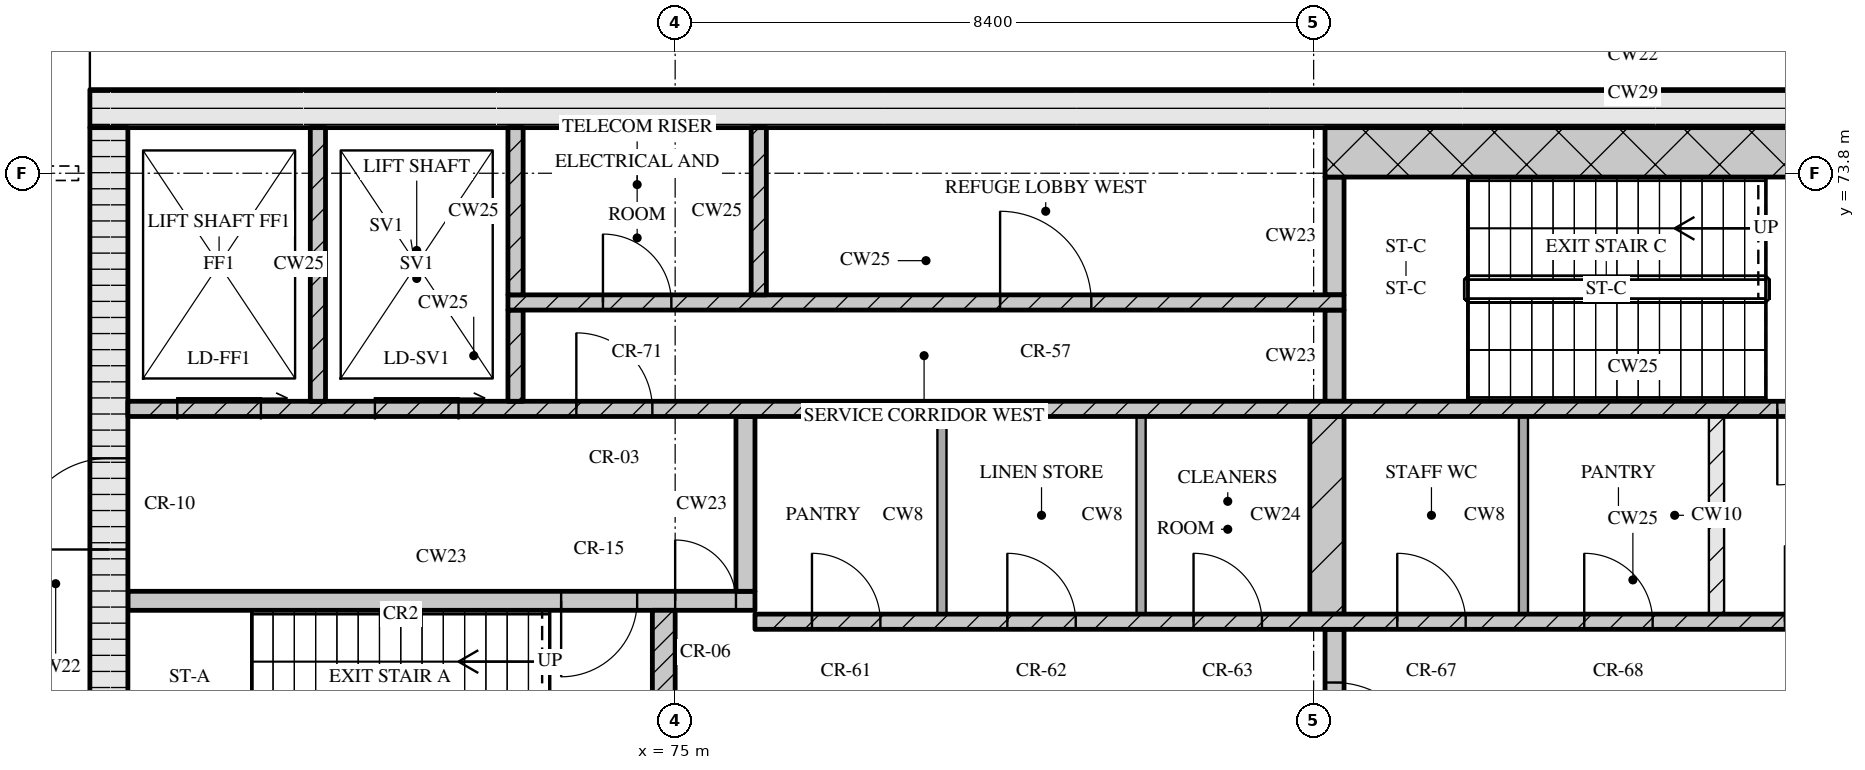
"""IFC4 building model, lengths in metres.
Left out: names, types, materials, properties, quantities, classifications, styles, units other than length and angle.
Written with IfcOpenShell. Run it as: python <this file> out.ifc"""

import sys

from ifc_helpers import new_model, si_unit, direction, frame, frame_2d, origin, place, context, subcontext, project, spatial, rectangle, extrude, element, fill, save


model = new_model("IFC4")
c1 = context("Model", 3, precision=1e-05, world=origin(), true_north=direction((0.0, 1.0)))
c2 = subcontext(c1, "Body", "Model", "MODEL_VIEW")
j1 = project(units=[si_unit("LENGTHUNIT", "METRE"), si_unit("PLANEANGLEUNIT", "RADIAN")], contexts=[c1])
p1 = place(None, origin())
s1 = spatial("IfcSite", under=j1, at=p1, CompositionType="ELEMENT")
p2 = place(p1, origin())
s2 = spatial("IfcBuilding", under=s1, at=p2, CompositionType="ELEMENT")
p3 = place(p2, frame((0.0, 0.0, 252.3)))
s3 = spatial("IfcBuildingStorey", under=s2, at=p3, CompositionType="ELEMENT", Elevation=252.3)
p4 = place(p3, frame((67.3, 74.65, 0.0), z_axis=(0.0, 0.0, 1.0), x_axis=(1.0, 0.0, 0.0)))
e1 = element("IfcWall", 1, at=p4, inside=s3, PredefinedType="SOLIDWALL", context=c2, shape_type="SweptSolid", body=[
    extrude(rectangle(XDim=40.6, YDim=0.5, at=frame_2d((20.3, 0.0))), origin(), (0.0, 0.0, 1.0), 10.97),
])
p5 = place(p3, frame((67.55, 62.4, 0.0), z_axis=(0.0, 0.0, 1.0), x_axis=(0.0, 1.0, 0.0)))
e2 = element("IfcWall", 2, at=p5, inside=s3, PredefinedType="SOLIDWALL", context=c2, shape_type="SweptSolid", body=[
    extrude(rectangle(XDim=12.0, YDim=0.5, at=frame_2d((6.0, 0.0))), origin(), (0.0, 0.0, 1.0), 10.97),
])
p6 = place(p5, frame((6.45, 0.0, 0.0)))
e3 = element("IfcOpeningElement", 3, at=p6, cuts=e2, PredefinedType="OPENING", context=c2, shape_type="SweptSolid", body=[
    extrude(rectangle(XDim=1.2, YDim=2.1, at=frame_2d((0.6, 1.05))), frame((0.0, 0.26, 0.0), z_axis=(0.0, -1.0, 0.0), x_axis=(1.0, 0.0, 0.0)), (0.0, 0.0, 1.0), 0.52),
])
p7 = place(p3, frame((74.85, 65.2, 0.0), z_axis=(0.0, 0.0, 1.0), x_axis=(0.0, 1.0, 0.0)))
e4 = element("IfcWall", 4, at=p7, inside=s3, PredefinedType="SOLIDWALL", context=c2, shape_type="SweptSolid", body=[
    extrude(rectangle(XDim=2.85, YDim=0.3, at=frame_2d((1.425, 0.0))), origin(), (0.0, 0.0, 1.0), 10.97),
])
p8 = place(p3, frame((83.675, 65.2, 0.0), z_axis=(0.0, 0.0, 1.0), x_axis=(0.0, 1.0, 0.0)))
e5 = element("IfcWall", 5, at=p8, inside=s3, PredefinedType="SOLIDWALL", context=c2, shape_type="SweptSolid", body=[
    extrude(rectangle(XDim=2.6, YDim=0.25, at=frame_2d((1.3, 0.0))), origin(), (0.0, 0.0, 1.0), 10.97),
])
p9 = place(p8, frame((0.7, 0.0, 0.0)))
e6 = element("IfcOpeningElement", 6, at=p9, cuts=e5, PredefinedType="OPENING", context=c2, shape_type="SweptSolid", body=[
    extrude(rectangle(XDim=1.2, YDim=2.1, at=frame_2d((0.6, 1.05))), frame((0.0, 0.135, 0.0), z_axis=(0.0, -1.0, 0.0), x_axis=(1.0, 0.0, 0.0)), (0.0, 0.0, 1.0), 0.27),
])
p10 = place(p3, frame((76.05, 67.9, 0.0), z_axis=(0.0, 0.0, 1.0), x_axis=(1.0, 0.0, 0.0)))
e7 = element("IfcWall", 7, at=p10, inside=s3, PredefinedType="SOLIDWALL", context=c2, shape_type="SweptSolid", body=[
    extrude(rectangle(XDim=23.1, YDim=0.2, at=frame_2d((11.55, 0.0))), origin(), (0.0, 0.0, 1.0), 10.97),
])
p11 = place(p10, frame((0.75, 0.0, 0.0)))
e8 = element("IfcOpeningElement", 8, at=p11, cuts=e7, PredefinedType="OPENING", context=c2, shape_type="SweptSolid", body=[
    extrude(rectangle(XDim=0.9, YDim=2.1, at=frame_2d((0.45, 1.05))), frame((0.0, 0.11, 0.0), z_axis=(0.0, -1.0, 0.0), x_axis=(1.0, 0.0, 0.0)), (0.0, 0.0, 1.0), 0.22),
])
p12 = place(p10, frame((3.32, 0.0, 0.0)))
e9 = element("IfcOpeningElement", 9, at=p12, cuts=e7, PredefinedType="OPENING", context=c2, shape_type="SweptSolid", body=[
    extrude(rectangle(XDim=0.9, YDim=2.1, at=frame_2d((0.45, 1.05))), frame((0.0, 0.11, 0.0), z_axis=(0.0, -1.0, 0.0), x_axis=(1.0, 0.0, 0.0)), (0.0, 0.0, 1.0), 0.22),
])
p13 = place(p10, frame((5.77, 0.0, 0.0)))
e10 = element("IfcOpeningElement", 10, at=p13, cuts=e7, PredefinedType="OPENING", context=c2, shape_type="SweptSolid", body=[
    extrude(rectangle(XDim=0.9, YDim=2.1, at=frame_2d((0.45, 1.05))), frame((0.0, 0.11, 0.0), z_axis=(0.0, -1.0, 0.0), x_axis=(1.0, 0.0, 0.0)), (0.0, 0.0, 1.0), 0.22),
])
p14 = place(p10, frame((8.45, 0.0, 0.0)))
e11 = element("IfcOpeningElement", 11, at=p14, cuts=e7, PredefinedType="OPENING", context=c2, shape_type="SweptSolid", body=[
    extrude(rectangle(XDim=0.9, YDim=2.1, at=frame_2d((0.45, 1.05))), frame((0.0, 0.11, 0.0), z_axis=(0.0, -1.0, 0.0), x_axis=(1.0, 0.0, 0.0)), (0.0, 0.0, 1.0), 0.22),
])
p15 = place(p10, frame((10.91, 0.0, 0.0)))
e12 = element("IfcOpeningElement", 12, at=p15, cuts=e7, PredefinedType="OPENING", context=c2, shape_type="SweptSolid", body=[
    extrude(rectangle(XDim=0.9, YDim=2.1, at=frame_2d((0.45, 1.05))), frame((0.0, 0.11, 0.0), z_axis=(0.0, -1.0, 0.0), x_axis=(1.0, 0.0, 0.0)), (0.0, 0.0, 1.0), 0.22),
])
p16 = place(p10, frame((13.55, 0.0, 0.0)))
e13 = element("IfcOpeningElement", 13, at=p16, cuts=e7, PredefinedType="OPENING", context=c2, shape_type="SweptSolid", body=[
    extrude(rectangle(XDim=1.0, YDim=2.1, at=frame_2d((0.5, 1.05))), frame((0.0, 0.11, 0.0), z_axis=(0.0, -1.0, 0.0), x_axis=(1.0, 0.0, 0.0)), (0.0, 0.0, 1.0), 0.22),
])
p17 = place(p10, frame((16.2, 0.0, 0.0)))
e14 = element("IfcOpeningElement", 14, at=p17, cuts=e7, PredefinedType="OPENING", context=c2, shape_type="SweptSolid", body=[
    extrude(rectangle(XDim=1.1, YDim=2.1, at=frame_2d((0.55, 1.05))), frame((0.0, 0.11, 0.0), z_axis=(0.0, -1.0, 0.0), x_axis=(1.0, 0.0, 0.0)), (0.0, 0.0, 1.0), 0.22),
])
p18 = place(p10, frame((18.7, 0.0, 0.0)))
e15 = element("IfcOpeningElement", 15, at=p18, cuts=e7, PredefinedType="OPENING", context=c2, shape_type="SweptSolid", body=[
    extrude(rectangle(XDim=1.1, YDim=2.1, at=frame_2d((0.55, 1.05))), frame((0.0, 0.11, 0.0), z_axis=(0.0, -1.0, 0.0), x_axis=(1.0, 0.0, 0.0)), (0.0, 0.0, 1.0), 0.22),
])
p19 = place(p10, frame((21.2, 0.0, 0.0)))
e16 = element("IfcOpeningElement", 16, at=p19, cuts=e7, PredefinedType="OPENING", context=c2, shape_type="SweptSolid", body=[
    extrude(rectangle(XDim=1.1, YDim=2.1, at=frame_2d((0.55, 1.05))), frame((0.0, 0.11, 0.0), z_axis=(0.0, -1.0, 0.0), x_axis=(1.0, 0.0, 0.0)), (0.0, 0.0, 1.0), 0.22),
])
for number, where, z_axis, x_axis in (
    (17, (78.51, 68.0, 0.0), (0.0, 0.0, 1.0), (0.0, 1.0, 0.0)),
    (18, (81.13, 68.0, 0.0), (0.0, 0.0, 1.0), (0.0, 1.0, 0.0)),
):
    element("IfcWall", number, at=place(p3, frame(where, z_axis=z_axis, x_axis=x_axis)), inside=s3, PredefinedType="PARTITIONING", context=c2, shape_type="SweptSolid", body=[
        extrude(rectangle(XDim=2.6, YDim=0.12, at=frame_2d((1.3, 0.0))), origin(), (0.0, 0.0, 1.0), 10.97),
    ])
p20 = place(p3, frame((83.575, 68.0, 0.0), z_axis=(0.0, 0.0, 1.0), x_axis=(0.0, 1.0, 0.0)))
e19 = element("IfcWall", 19, at=p20, inside=s3, PredefinedType="SOLIDWALL", context=c2, shape_type="SweptSolid", body=[
    extrude(rectangle(XDim=2.6, YDim=0.45, at=frame_2d((1.3, 0.0))), origin(), (0.0, 0.0, 1.0), 10.97),
])
p21 = place(p3, frame((86.16, 68.0, 0.0), z_axis=(0.0, 0.0, 1.0), x_axis=(0.0, 1.0, 0.0)))
e20 = element("IfcWall", 20, at=p21, inside=s3, PredefinedType="PARTITIONING", context=c2, shape_type="SweptSolid", body=[
    extrude(rectangle(XDim=2.6, YDim=0.12, at=frame_2d((1.3, 0.0))), origin(), (0.0, 0.0, 1.0), 10.97),
])
p22 = place(p3, frame((88.7, 68.0, 0.0), z_axis=(0.0, 0.0, 1.0), x_axis=(0.0, 1.0, 0.0)))
e21 = element("IfcWall", 21, at=p22, inside=s3, PredefinedType="PARTITIONING", context=c2, shape_type="SweptSolid", body=[
    extrude(rectangle(XDim=2.6, YDim=0.2, at=frame_2d((1.3, 0.0))), origin(), (0.0, 0.0, 1.0), 10.97),
])
p23 = place(p3, frame((67.8, 68.175, 0.0), z_axis=(0.0, 0.0, 1.0), x_axis=(1.0, 0.0, 0.0)))
e22 = element("IfcWall", 22, at=p23, inside=s3, PredefinedType="SOLIDWALL", context=c2, shape_type="SweptSolid", body=[
    extrude(rectangle(XDim=8.25, YDim=0.25, at=frame_2d((4.125, 0.0))), origin(), (0.0, 0.0, 1.0), 10.97),
])
p24 = place(p23, frame((5.7, 0.0, 0.0)))
e23 = element("IfcOpeningElement", 23, at=p24, cuts=e22, PredefinedType="OPENING", context=c2, shape_type="SweptSolid", body=[
    extrude(rectangle(XDim=1.0, YDim=2.1, at=frame_2d((0.5, 1.05))), frame((0.0, 0.135, 0.0), z_axis=(0.0, -1.0, 0.0), x_axis=(1.0, 0.0, 0.0)), (0.0, 0.0, 1.0), 0.27),
])
p25 = place(p23, frame((7.2, 0.0, 0.0)))
e24 = element("IfcOpeningElement", 24, at=p25, cuts=e22, PredefinedType="OPENING", context=c2, shape_type="SweptSolid", body=[
    extrude(rectangle(XDim=0.8, YDim=2.1, at=frame_2d((0.4, 1.05))), frame((0.0, 0.135, 0.0), z_axis=(0.0, -1.0, 0.0), x_axis=(1.0, 0.0, 0.0)), (0.0, 0.0, 1.0), 0.27),
])
p26 = place(p3, frame((75.925, 68.3, 0.0), z_axis=(0.0, 0.0, 1.0), x_axis=(0.0, 1.0, 0.0)))
e25 = element("IfcWall", 25, at=p26, inside=s3, PredefinedType="SOLIDWALL", context=c2, shape_type="SweptSolid", body=[
    extrude(rectangle(XDim=2.3, YDim=0.25, at=frame_2d((1.15, 0.0))), origin(), (0.0, 0.0, 1.0), 10.97),
])
p27 = place(p3, frame((67.8, 70.7, 0.0), z_axis=(0.0, 0.0, 1.0), x_axis=(1.0, 0.0, 0.0)))
e26 = element("IfcWall", 26, at=p27, inside=s3, PredefinedType="SOLIDWALL", context=c2, shape_type="SweptSolid", body=[
    extrude(rectangle(XDim=39.6, YDim=0.2, at=frame_2d((19.8, 0.0))), origin(), (0.0, 0.0, 1.0), 10.97),
])
p28 = place(p27, frame((0.65, 0.0, 0.0)))
e27 = element("IfcOpeningElement", 27, at=p28, cuts=e26, PredefinedType="OPENING", context=c2, shape_type="SweptSolid", body=[
    extrude(rectangle(XDim=1.1, YDim=2.1, at=frame_2d((0.55, 1.05))), frame((0.0, 0.11, 0.0), z_axis=(0.0, -1.0, 0.0), x_axis=(1.0, 0.0, 0.0)), (0.0, 0.0, 1.0), 0.22),
])
p29 = place(p27, frame((3.25, 0.0, 0.0)))
e28 = element("IfcOpeningElement", 28, at=p29, cuts=e26, PredefinedType="OPENING", context=c2, shape_type="SweptSolid", body=[
    extrude(rectangle(XDim=1.1, YDim=2.1, at=frame_2d((0.55, 1.05))), frame((0.0, 0.11, 0.0), z_axis=(0.0, -1.0, 0.0), x_axis=(1.0, 0.0, 0.0)), (0.0, 0.0, 1.0), 0.22),
])
p30 = place(p27, frame((5.9, 0.0, 0.0)))
e29 = element("IfcOpeningElement", 29, at=p30, cuts=e26, PredefinedType="OPENING", context=c2, shape_type="SweptSolid", body=[
    extrude(rectangle(XDim=1.0, YDim=2.1, at=frame_2d((0.5, 1.05))), frame((0.0, 0.11, 0.0), z_axis=(0.0, -1.0, 0.0), x_axis=(1.0, 0.0, 0.0)), (0.0, 0.0, 1.0), 0.22),
])
p31 = place(p27, frame((21.7, 0.0, 0.0)))
e30 = element("IfcOpeningElement", 30, at=p31, cuts=e26, PredefinedType="OPENING", context=c2, shape_type="SweptSolid", body=[
    extrude(rectangle(XDim=1.0, YDim=2.1, at=frame_2d((0.5, 1.05))), frame((0.0, 0.11, 0.0), z_axis=(0.0, -1.0, 0.0), x_axis=(1.0, 0.0, 0.0)), (0.0, 0.0, 1.0), 0.22),
])
p32 = place(p27, frame((32.7, 0.0, 0.0)))
e31 = element("IfcOpeningElement", 31, at=p32, cuts=e26, PredefinedType="OPENING", context=c2, shape_type="SweptSolid", body=[
    extrude(rectangle(XDim=1.0, YDim=2.1, at=frame_2d((0.5, 1.05))), frame((0.0, 0.11, 0.0), z_axis=(0.0, -1.0, 0.0), x_axis=(1.0, 0.0, 0.0)), (0.0, 0.0, 1.0), 0.22),
])
p33 = place(p27, frame((35.25, 0.0, 0.0)))
e32 = element("IfcOpeningElement", 32, at=p33, cuts=e26, PredefinedType="OPENING", context=c2, shape_type="SweptSolid", body=[
    extrude(rectangle(XDim=1.1, YDim=2.1, at=frame_2d((0.55, 1.05))), frame((0.0, 0.11, 0.0), z_axis=(0.0, -1.0, 0.0), x_axis=(1.0, 0.0, 0.0)), (0.0, 0.0, 1.0), 0.22),
])
p34 = place(p27, frame((37.85, 0.0, 0.0)))
e33 = element("IfcOpeningElement", 33, at=p34, cuts=e26, PredefinedType="OPENING", context=c2, shape_type="SweptSolid", body=[
    extrude(rectangle(XDim=1.1, YDim=2.1, at=frame_2d((0.55, 1.05))), frame((0.0, 0.11, 0.0), z_axis=(0.0, -1.0, 0.0), x_axis=(1.0, 0.0, 0.0)), (0.0, 0.0, 1.0), 0.22),
])
p35 = place(p3, frame((70.3, 70.8, 0.0), z_axis=(0.0, 0.0, 1.0), x_axis=(0.0, 1.0, 0.0)))
e34 = element("IfcWall", 34, at=p35, inside=s3, PredefinedType="SOLIDWALL", context=c2, shape_type="SweptSolid", body=[
    extrude(rectangle(XDim=3.6, YDim=0.2, at=frame_2d((1.8, 0.0))), origin(), (0.0, 0.0, 1.0), 10.97),
])
p36 = place(p3, frame((72.9, 70.8, 0.0), z_axis=(0.0, 0.0, 1.0), x_axis=(0.0, 1.0, 0.0)))
e35 = element("IfcWall", 35, at=p36, inside=s3, PredefinedType="SOLIDWALL", context=c2, shape_type="SweptSolid", body=[
    extrude(rectangle(XDim=1.2, YDim=0.2, at=frame_2d((0.6, 0.0))), origin(), (0.0, 0.0, 1.0), 10.97),
])
p37 = place(p3, frame((83.675, 70.8, 0.0), z_axis=(0.0, 0.0, 1.0), x_axis=(0.0, 1.0, 0.0)))
e36 = element("IfcWall", 36, at=p37, inside=s3, PredefinedType="SOLIDWALL", context=c2, shape_type="SweptSolid", body=[
    extrude(rectangle(XDim=1.2, YDim=0.25, at=frame_2d((0.6, 0.0))), origin(), (0.0, 0.0, 1.0), 10.97),
])
p38 = place(p3, frame((72.8, 72.1, 0.0), z_axis=(0.0, 0.0, 1.0), x_axis=(1.0, 0.0, 0.0)))
e37 = element("IfcWall", 37, at=p38, inside=s3, PredefinedType="SOLIDWALL", context=c2, shape_type="SweptSolid", body=[
    extrude(rectangle(XDim=11.0, YDim=0.2, at=frame_2d((5.5, 0.0))), origin(), (0.0, 0.0, 1.0), 10.97),
])
p39 = place(p38, frame((1.25, 0.0, 0.0)))
e38 = element("IfcOpeningElement", 38, at=p39, cuts=e37, PredefinedType="OPENING", context=c2, shape_type="SweptSolid", body=[
    extrude(rectangle(XDim=0.9, YDim=2.1, at=frame_2d((0.45, 1.05))), frame((0.0, 0.11, 0.0), z_axis=(0.0, -1.0, 0.0), x_axis=(1.0, 0.0, 0.0)), (0.0, 0.0, 1.0), 0.22),
])
p40 = place(p38, frame((6.475, 0.0, 0.0)))
e39 = element("IfcOpeningElement", 39, at=p40, cuts=e37, PredefinedType="OPENING", context=c2, shape_type="SweptSolid", body=[
    extrude(rectangle(XDim=1.2, YDim=2.1, at=frame_2d((0.6, 1.05))), frame((0.0, 0.11, 0.0), z_axis=(0.0, -1.0, 0.0), x_axis=(1.0, 0.0, 0.0)), (0.0, 0.0, 1.0), 0.22),
])
for number, where, z_axis, x_axis in (
    (40, (72.9, 72.2, 0.0), (0.0, 0.0, 1.0), (0.0, 1.0, 0.0)),
    (41, (76.1, 72.2, 0.0), (0.0, 0.0, 1.0), (0.0, 1.0, 0.0)),
):
    element("IfcWall", number, at=place(p3, frame(where, z_axis=z_axis, x_axis=x_axis)), inside=s3, PredefinedType="SOLIDWALL", context=c2, shape_type="SweptSolid", body=[
        extrude(rectangle(XDim=2.2, YDim=0.2, at=frame_2d((1.1, 0.0))), origin(), (0.0, 0.0, 1.0), 10.97),
    ])
p41 = place(p3, frame((83.675, 72.2, 0.0), z_axis=(0.0, 0.0, 1.0), x_axis=(0.0, 1.0, 0.0)))
e42 = element("IfcWall", 42, at=p41, inside=s3, PredefinedType="SOLIDWALL", context=c2, shape_type="SweptSolid", body=[
    extrude(rectangle(XDim=1.55, YDim=0.25, at=frame_2d((0.775, 0.0))), origin(), (0.0, 0.0, 1.0), 10.97),
])
p42 = place(p3, frame((83.55, 74.075, 0.0), z_axis=(0.0, 0.0, 1.0), x_axis=(1.0, 0.0, 0.0)))
e43 = element("IfcWall", 43, at=p42, inside=s3, PredefinedType="SOLIDWALL", context=c2, shape_type="SweptSolid", body=[
    extrude(rectangle(XDim=8.1, YDim=0.65, at=frame_2d((4.05, 0.0))), origin(), (0.0, 0.0, 1.0), 10.97),
])
p43 = place(p9, origin())
e44 = element("IfcDoor", 44, at=p43, inside=s3, OperationType="SINGLE_SWING_RIGHT", PredefinedType="DOOR", context=c2, shape_type="SweptSolid", body=[
    extrude(rectangle(XDim=1.2, YDim=2.1, at=frame_2d((0.6, 1.05))), frame((0.0, 0.025, 0.0), z_axis=(0.0, -1.0, 0.0), x_axis=(1.0, 0.0, 0.0)), (0.0, 0.0, 1.0), 0.05),
])
fill(e6, e44)
p44 = place(p11, origin())
e45 = element("IfcDoor", 45, at=p44, inside=s3, OperationType="SINGLE_SWING_LEFT", PredefinedType="DOOR", context=c2, shape_type="SweptSolid", body=[
    extrude(rectangle(XDim=0.9, YDim=2.1, at=frame_2d((0.45, 1.05))), frame((0.0, 0.025, 0.0), z_axis=(0.0, -1.0, 0.0), x_axis=(1.0, 0.0, 0.0)), (0.0, 0.0, 1.0), 0.05),
])
fill(e8, e45)
p45 = place(p12, origin())
e46 = element("IfcDoor", 46, at=p45, inside=s3, OperationType="SINGLE_SWING_LEFT", PredefinedType="DOOR", context=c2, shape_type="SweptSolid", body=[
    extrude(rectangle(XDim=0.9, YDim=2.1, at=frame_2d((0.45, 1.05))), frame((0.0, 0.025, 0.0), z_axis=(0.0, -1.0, 0.0), x_axis=(1.0, 0.0, 0.0)), (0.0, 0.0, 1.0), 0.05),
])
fill(e9, e46)
p46 = place(p13, origin())
e47 = element("IfcDoor", 47, at=p46, inside=s3, OperationType="SINGLE_SWING_LEFT", PredefinedType="DOOR", context=c2, shape_type="SweptSolid", body=[
    extrude(rectangle(XDim=0.9, YDim=2.1, at=frame_2d((0.45, 1.05))), frame((0.0, 0.025, 0.0), z_axis=(0.0, -1.0, 0.0), x_axis=(1.0, 0.0, 0.0)), (0.0, 0.0, 1.0), 0.05),
])
fill(e10, e47)
p47 = place(p14, origin())
e48 = element("IfcDoor", 48, at=p47, inside=s3, OperationType="SINGLE_SWING_LEFT", PredefinedType="DOOR", context=c2, shape_type="SweptSolid", body=[
    extrude(rectangle(XDim=0.9, YDim=2.1, at=frame_2d((0.45, 1.05))), frame((0.0, 0.025, 0.0), z_axis=(0.0, -1.0, 0.0), x_axis=(1.0, 0.0, 0.0)), (0.0, 0.0, 1.0), 0.05),
])
fill(e11, e48)
p48 = place(p15, origin())
e49 = element("IfcDoor", 49, at=p48, inside=s3, OperationType="SINGLE_SWING_LEFT", PredefinedType="DOOR", context=c2, shape_type="SweptSolid", body=[
    extrude(rectangle(XDim=0.9, YDim=2.1, at=frame_2d((0.45, 1.05))), frame((0.0, 0.025, 0.0), z_axis=(0.0, -1.0, 0.0), x_axis=(1.0, 0.0, 0.0)), (0.0, 0.0, 1.0), 0.05),
])
fill(e12, e49)
p49 = place(p24, origin())
e50 = element("IfcDoor", 50, at=p49, inside=s3, OperationType="SINGLE_SWING_RIGHT", PredefinedType="DOOR", context=c2, shape_type="SweptSolid", body=[
    extrude(rectangle(XDim=1.0, YDim=2.1, at=frame_2d((0.5, 1.05))), frame((0.0, 0.025, 0.0), z_axis=(0.0, -1.0, 0.0), x_axis=(1.0, 0.0, 0.0)), (0.0, 0.0, 1.0), 0.05),
])
fill(e23, e50)
p50 = place(p25, origin())
e51 = element("IfcDoor", 51, at=p50, inside=s3, OperationType="SINGLE_SWING_LEFT", PredefinedType="DOOR", context=c2, shape_type="SweptSolid", body=[
    extrude(rectangle(XDim=0.8, YDim=2.1, at=frame_2d((0.4, 1.05))), frame((0.0, 0.025, 0.0), z_axis=(0.0, -1.0, 0.0), x_axis=(1.0, 0.0, 0.0)), (0.0, 0.0, 1.0), 0.05),
])
fill(e24, e51)
p51 = place(p6, origin())
e52 = element("IfcDoor", 52, at=p51, inside=s3, OperationType="SINGLE_SWING_LEFT", PredefinedType="DOOR", context=c2, shape_type="SweptSolid", body=[
    extrude(rectangle(XDim=1.2, YDim=2.1, at=frame_2d((0.6, 1.05))), frame((0.0, 0.025, 0.0), z_axis=(0.0, -1.0, 0.0), x_axis=(1.0, 0.0, 0.0)), (0.0, 0.0, 1.0), 0.05),
])
fill(e3, e52)
p52 = place(p28, origin())
e53 = element("IfcDoor", 53, at=p52, inside=s3, OperationType="SLIDING_TO_RIGHT", PredefinedType="DOOR", context=c2, shape_type="SweptSolid", body=[
    extrude(rectangle(XDim=1.1, YDim=2.1, at=frame_2d((0.55, 1.05))), frame((0.0, 0.025, 0.0), z_axis=(0.0, -1.0, 0.0), x_axis=(1.0, 0.0, 0.0)), (0.0, 0.0, 1.0), 0.05),
])
fill(e27, e53)
p53 = place(p29, origin())
e54 = element("IfcDoor", 54, at=p53, inside=s3, OperationType="SLIDING_TO_RIGHT", PredefinedType="DOOR", context=c2, shape_type="SweptSolid", body=[
    extrude(rectangle(XDim=1.1, YDim=2.1, at=frame_2d((0.55, 1.05))), frame((0.0, 0.025, 0.0), z_axis=(0.0, -1.0, 0.0), x_axis=(1.0, 0.0, 0.0)), (0.0, 0.0, 1.0), 0.05),
])
fill(e28, e54)
p54 = place(p30, origin())
e55 = element("IfcDoor", 55, at=p54, inside=s3, OperationType="SINGLE_SWING_LEFT", PredefinedType="DOOR", context=c2, shape_type="SweptSolid", body=[
    extrude(rectangle(XDim=1.0, YDim=2.1, at=frame_2d((0.5, 1.05))), frame((0.0, 0.025, 0.0), z_axis=(0.0, -1.0, 0.0), x_axis=(1.0, 0.0, 0.0)), (0.0, 0.0, 1.0), 0.05),
])
fill(e29, e55)
p55 = place(p31, origin())
e56 = element("IfcDoor", 56, at=p55, inside=s3, OperationType="SINGLE_SWING_RIGHT", PredefinedType="DOOR", context=c2, shape_type="SweptSolid", body=[
    extrude(rectangle(XDim=1.0, YDim=2.1, at=frame_2d((0.5, 1.05))), frame((0.0, 0.025, 0.0), z_axis=(0.0, -1.0, 0.0), x_axis=(1.0, 0.0, 0.0)), (0.0, 0.0, 1.0), 0.05),
])
fill(e30, e56)
p56 = place(p39, origin())
e57 = element("IfcDoor", 57, at=p56, inside=s3, OperationType="SINGLE_SWING_LEFT", PredefinedType="DOOR", context=c2, shape_type="SweptSolid", body=[
    extrude(rectangle(XDim=0.9, YDim=2.1, at=frame_2d((0.45, 1.05))), frame((0.0, 0.025, 0.0), z_axis=(0.0, -1.0, 0.0), x_axis=(1.0, 0.0, 0.0)), (0.0, 0.0, 1.0), 0.05),
])
fill(e38, e57)
p57 = place(p40, origin())
e58 = element("IfcDoor", 58, at=p57, inside=s3, OperationType="SINGLE_SWING_LEFT", PredefinedType="DOOR", context=c2, shape_type="SweptSolid", body=[
    extrude(rectangle(XDim=1.2, YDim=2.1, at=frame_2d((0.6, 1.05))), frame((0.0, 0.025, 0.0), z_axis=(0.0, -1.0, 0.0), x_axis=(1.0, 0.0, 0.0)), (0.0, 0.0, 1.0), 0.05),
])
fill(e39, e58)
save(model, sys.argv[1])
